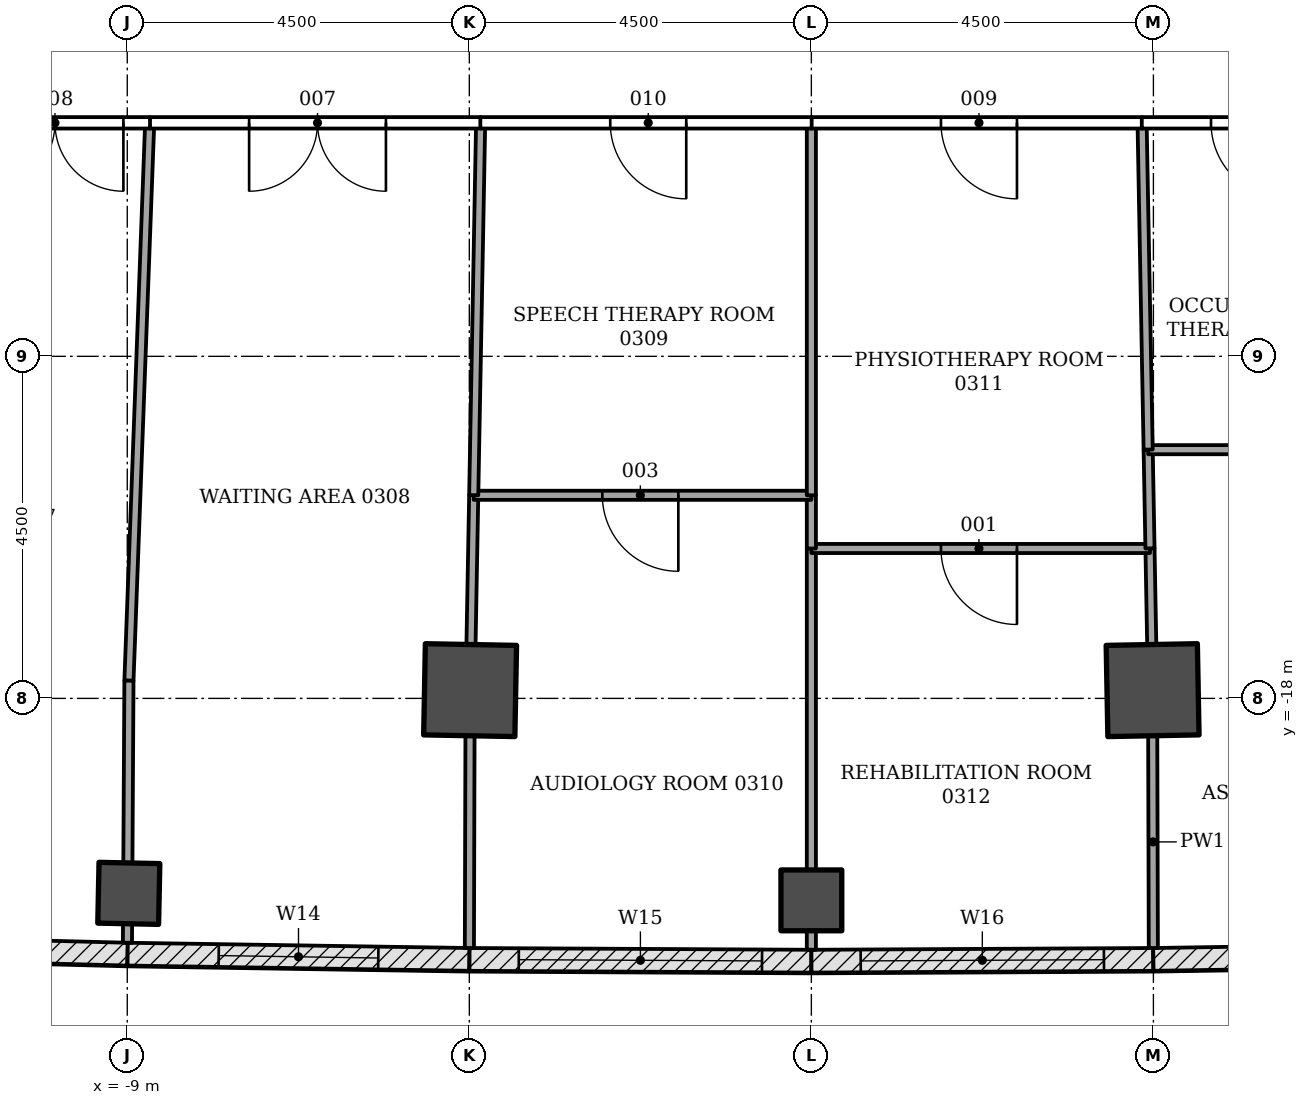
"""IFC4 building model, lengths in metres.
Left out: names, types, materials, properties, quantities, classifications, styles, units other than length and angle.
Written with IfcOpenShell. Run it as: python <this file> out.ifc"""

import sys

from ifc_helpers import new_model, si_unit, direction, frame, frame_2d, origin, origin_2d, place, context, subcontext, project, spatial, rectangle, extrude, element, fill, save


model = new_model("IFC4")
c1 = context("Model", 3, precision=1e-05, world=origin(), true_north=direction((0.0, 1.0)))
c2 = subcontext(c1, "Body", "Model", "MODEL_VIEW")
j1 = project(units=[si_unit("LENGTHUNIT", "METRE"), si_unit("PLANEANGLEUNIT", "RADIAN")], contexts=[c1])
p1 = place(None, origin())
s1 = spatial("IfcSite", under=j1, at=p1, CompositionType="ELEMENT")
p2 = place(p1, origin())
s2 = spatial("IfcBuilding", under=s1, at=p2, CompositionType="ELEMENT")
p3 = place(p2, frame((0.0, 0.0, 15.0)))
s3 = spatial("IfcBuildingStorey", under=s2, at=p3, CompositionType="ELEMENT", Elevation=15.0)
for number, where, z_axis, x_axis in (
    (1, (-4.49, -17.892, -0.25), (0.0, 0.0, 1.0), (-0.019, -1.0, 0.0)),
    (2, (4.49, -17.892, -0.25), (0.0, 0.0, 1.0), (0.019, -1.0, 0.0)),
):
    element("IfcColumn", number, at=place(p3, frame(where, z_axis=z_axis, x_axis=x_axis)), inside=s3, PredefinedType="COLUMN", context=c2, shape_type="SweptSolid", body=[
        extrude(rectangle(XDim=1.2, YDim=1.2, at=origin_2d()), origin(), (0.0, 0.0, 1.0), 4.5),
    ])
for number, where, z_axis, x_axis in (
    (3, (-8.98, -20.565, -0.25), (0.0, 0.0, 1.0), (-0.021, -1.0, 0.0)),
    (4, (0.0, -20.657, -0.25), (0.0, 0.0, 1.0), (0.0, -1.0, 0.0)),
):
    element("IfcColumn", number, at=place(p3, frame(where, z_axis=z_axis, x_axis=x_axis)), inside=s3, PredefinedType="COLUMN", context=c2, shape_type="SweptSolid", body=[
        extrude(rectangle(XDim=0.8, YDim=0.8, at=origin_2d()), origin(), (0.0, 0.0, 1.0), 4.5),
    ])
p4 = place(p3, frame((-9.922, -5.728, -0.25), z_axis=(0.0, 0.0, 1.0), x_axis=(-0.866028046028, -0.499995423472, 0.0)))
e5 = element("IfcWall", 5, at=p4, inside=s3, PredefinedType="SHEAR", context=c2, shape_type="SweptSolid", body=[
    extrude(rectangle(XDim=14.633, YDim=0.9, at=frame_2d((7.316, 0.0))), origin(), (0.0, 0.0, 1.0), 4.5),
])
p5 = place(p4, frame((7.35, 0.0, 0.25)))
e6 = element("IfcOpeningElement", 6, at=p5, cuts=e5, PredefinedType="OPENING", context=c2, shape_type="SweptSolid", body=[
    extrude(rectangle(XDim=1.5, YDim=2.1, at=frame_2d((0.75, 1.05))), frame((0.0, 0.46, 0.0), z_axis=(0.0, -1.0, 0.0), x_axis=(1.0, 0.0, 0.0)), (0.0, 0.0, 1.0), 0.92),
])
p6 = place(p3, frame((-8.998, -21.365, 0.0), z_axis=(0.0, 0.0, 1.0), x_axis=(-0.999671466587, 0.025631209312, 0.0)))
e7 = element("IfcWall", 7, at=p6, inside=s3, PredefinedType="NOTDEFINED", context=c2, shape_type="SweptSolid", body=[
    extrude(rectangle(XDim=4.496, YDim=0.3, at=frame_2d((2.248, 0.0))), origin(), (0.0, 0.0, 1.0), 4.25),
])
p7 = place(p6, frame((1.048, 0.0, 0.9)))
e8 = element("IfcOpeningElement", 8, at=p7, cuts=e7, PredefinedType="OPENING", context=c2, shape_type="SweptSolid", body=[
    extrude(rectangle(XDim=2.4, YDim=2.4, at=frame_2d((1.2, 1.2))), frame((0.0, 0.16, 0.0), z_axis=(0.0, -1.0, 0.0), x_axis=(1.0, 0.0, 0.0)), (0.0, 0.0, 1.0), 0.32),
])
p8 = place(p3, frame((-4.5, -21.434, 0.0), z_axis=(0.0, 0.0, 1.0), x_axis=(-0.999881921814, 0.015366926462, 0.0)))
e9 = element("IfcWall", 9, at=p8, inside=s3, PredefinedType="NOTDEFINED", context=c2, shape_type="SweptSolid", body=[
    extrude(rectangle(XDim=4.496, YDim=0.3, at=frame_2d((2.248, 0.0))), origin(), (0.0, 0.0, 1.0), 4.25),
])
p9 = place(p8, frame((1.198, 0.0, 0.8)))
e10 = element("IfcOpeningElement", 10, at=p9, cuts=e9, PredefinedType="OPENING", context=c2, shape_type="SweptSolid", body=[
    extrude(rectangle(XDim=2.1, YDim=3.0, at=frame_2d((1.05, 1.5))), frame((0.0, 0.16, 0.0), z_axis=(0.0, -1.0, 0.0), x_axis=(1.0, 0.0, 0.0)), (0.0, 0.0, 1.0), 0.32),
])
p10 = place(p3, frame((-0.001, -21.457, 0.0), z_axis=(0.0, 0.0, 1.0), x_axis=(-0.999986693461, 0.005158769258, 0.0)))
e11 = element("IfcWall", 11, at=p10, inside=s3, PredefinedType="NOTDEFINED", context=c2, shape_type="SweptSolid", body=[
    extrude(rectangle(XDim=4.496, YDim=0.3, at=frame_2d((2.248, 0.0))), origin(), (0.0, 0.0, 1.0), 4.25),
])
p11 = place(p10, frame((0.648, 0.0, 0.8)))
e12 = element("IfcOpeningElement", 12, at=p11, cuts=e11, PredefinedType="OPENING", context=c2, shape_type="SweptSolid", body=[
    extrude(rectangle(XDim=3.2, YDim=2.7, at=frame_2d((1.6, 1.35))), frame((0.0, 0.16, 0.0), z_axis=(0.0, -1.0, 0.0), x_axis=(1.0, 0.0, 0.0)), (0.0, 0.0, 1.0), 0.32),
])
p12 = place(p3, frame((4.497, -21.434, 0.0), z_axis=(0.0, 0.0, 1.0), x_axis=(-0.999986693461, -0.005158769258, 0.0)))
e13 = element("IfcWall", 13, at=p12, inside=s3, PredefinedType="NOTDEFINED", context=c2, shape_type="SweptSolid", body=[
    extrude(rectangle(XDim=4.496, YDim=0.3, at=frame_2d((2.248, 0.0))), origin(), (0.0, 0.0, 1.0), 4.25),
])
p13 = place(p12, frame((0.648, 0.0, 0.8)))
e14 = element("IfcOpeningElement", 14, at=p13, cuts=e13, PredefinedType="OPENING", context=c2, shape_type="SweptSolid", body=[
    extrude(rectangle(XDim=3.2, YDim=2.7, at=frame_2d((1.6, 1.35))), frame((0.0, 0.16, 0.0), z_axis=(0.0, -1.0, 0.0), x_axis=(1.0, 0.0, 0.0)), (0.0, 0.0, 1.0), 0.32),
])
p14 = place(p3, frame((8.995, -21.365, 0.0), z_axis=(0.0, 0.0, 1.0), x_axis=(-0.999881921814, -0.015366926462, 0.0)))
e15 = element("IfcWall", 15, at=p14, inside=s3, PredefinedType="NOTDEFINED", context=c2, shape_type="SweptSolid", body=[
    extrude(rectangle(XDim=4.496, YDim=0.3, at=frame_2d((2.248, 0.0))), origin(), (0.0, 0.0, 1.0), 4.25),
])
p15 = place(p14, frame((1.198, 0.0, 0.8)))
e16 = element("IfcOpeningElement", 16, at=p15, cuts=e15, PredefinedType="OPENING", context=c2, shape_type="SweptSolid", body=[
    extrude(rectangle(XDim=2.1, YDim=3.0, at=frame_2d((1.05, 1.5))), frame((0.0, 0.16, 0.0), z_axis=(0.0, -1.0, 0.0), x_axis=(1.0, 0.0, 0.0)), (0.0, 0.0, 1.0), 0.32),
])
p16 = place(p3, frame((4.478, -17.291, 0.0), z_axis=(0.0, 0.0, 1.0), x_axis=(-0.018108783452, 0.999836022537, 0.0)))
e17 = element("IfcWall", 17, at=p16, inside=s3, PredefinedType="PARTITIONING", context=c2, shape_type="SweptSolid", body=[
    extrude(rectangle(XDim=1.267, YDim=0.12, at=frame_2d((0.634, 0.0))), origin(), (0.0, 0.0, 1.0), 3.638),
])
p17 = place(p3, frame((4.499, -21.284, 0.0), z_axis=(0.0, 0.0, 1.0), x_axis=(-0.00288561233, 0.999995836612, 0.0)))
e18 = element("IfcWall", 18, at=p17, inside=s3, PredefinedType="PARTITIONING", context=c2, shape_type="SweptSolid", body=[
    extrude(rectangle(XDim=2.792, YDim=0.12, at=frame_2d((1.396, 0.0))), origin(), (0.0, 0.0, 1.0), 3.633),
])
p18 = place(p3, frame((0.0, -21.057, 0.0), z_axis=(0.0, 0.0, 1.0), x_axis=(0.0, -1.0, 0.0)))
e19 = element("IfcWall", 19, at=p18, inside=s3, PredefinedType="PARTITIONING", context=c2, shape_type="SweptSolid", body=[
    extrude(rectangle(XDim=0.25, YDim=0.12, at=frame_2d((0.125, 0.0))), origin(), (0.0, 0.0, 1.0), 4.25),
])
p19 = place(p3, frame((0.0, -16.024, 0.0), z_axis=(0.0, 0.0, 1.0), x_axis=(0.0, -1.0, 0.0)))
e20 = element("IfcWall", 20, at=p19, inside=s3, PredefinedType="PARTITIONING", context=c2, shape_type="SweptSolid", body=[
    extrude(rectangle(XDim=4.233, YDim=0.12, at=frame_2d((2.117, 0.0))), origin(), (0.0, 0.0, 1.0), 3.638),
])
p20 = place(p3, frame((4.455, -16.028, 0.0), z_axis=(0.0, 0.0, 1.0), x_axis=(-1.0, 0.0, 0.0)))
e21 = element("IfcWall", 21, at=p20, inside=s3, PredefinedType="PARTITIONING", context=c2, shape_type="SweptSolid", body=[
    extrude(rectangle(XDim=4.455, YDim=0.12, at=frame_2d((2.228, 0.0))), origin(), (0.0, 0.0, 1.0), 3.638),
])
p21 = place(p20, frame((1.75, 0.0, 0.0)))
e22 = element("IfcOpeningElement", 22, at=p21, cuts=e21, PredefinedType="OPENING", context=c2, shape_type="SweptSolid", body=[
    extrude(rectangle(XDim=1.0, YDim=2.1, at=frame_2d((0.5, 1.05))), frame((0.0, 0.07, 0.0), z_axis=(0.0, -1.0, 0.0), x_axis=(1.0, 0.0, 0.0)), (0.0, 0.0, 1.0), 0.14),
])
p22 = place(p3, frame((4.431, -14.724, 0.0), z_axis=(0.0, 0.0, 1.0), x_axis=(0.018546556452, -0.99982799783, 0.0)))
e23 = element("IfcWall", 23, at=p22, inside=s3, PredefinedType="PARTITIONING", context=c2, shape_type="SweptSolid", body=[
    extrude(rectangle(XDim=1.303, YDim=0.12, at=frame_2d((0.652, 0.0))), origin(), (0.0, 0.0, 1.0), 3.638),
])
p23 = place(p3, frame((8.865, -14.728, 0.0), z_axis=(0.0, 0.0, 1.0), x_axis=(-1.0, 0.0, 0.0)))
e24 = element("IfcWall", 24, at=p23, inside=s3, PredefinedType="PARTITIONING", context=c2, shape_type="SweptSolid", body=[
    extrude(rectangle(XDim=4.434, YDim=0.12, at=frame_2d((2.217, 0.0))), origin(), (0.0, 0.0, 1.0), 3.638),
])
p24 = place(p23, frame((1.75, 0.0, 0.0)))
e25 = element("IfcOpeningElement", 25, at=p24, cuts=e24, PredefinedType="OPENING", context=c2, shape_type="SweptSolid", body=[
    extrude(rectangle(XDim=1.0, YDim=2.1, at=frame_2d((0.5, 1.05))), frame((0.0, 0.07, 0.0), z_axis=(0.0, -1.0, 0.0), x_axis=(1.0, 0.0, 0.0)), (0.0, 0.0, 1.0), 0.14),
])
p25 = place(p3, frame((-4.491, -18.492, 0.0), z_axis=(0.0, 0.0, 1.0), x_axis=(-0.00288561233, -0.999995836612, 0.0)))
e26 = element("IfcWall", 26, at=p25, inside=s3, PredefinedType="PARTITIONING", context=c2, shape_type="SweptSolid", body=[
    extrude(rectangle(XDim=2.792, YDim=0.12, at=frame_2d((1.396, 0.0))), origin(), (0.0, 0.0, 1.0), 3.633),
])
p26 = place(p3, frame((-4.442, -15.324, 0.0), z_axis=(0.0, 0.0, 1.0), x_axis=(-0.018366021708, -0.999831330399, 0.0)))
e27 = element("IfcWall", 27, at=p26, inside=s3, PredefinedType="PARTITIONING", context=c2, shape_type="SweptSolid", body=[
    extrude(rectangle(XDim=1.967, YDim=0.12, at=frame_2d((0.984, 0.0))), origin(), (0.0, 0.0, 1.0), 3.638),
])
p27 = place(p3, frame((0.0, -16.028, 0.0), z_axis=(0.0, 0.0, 1.0), x_axis=(0.0, 1.0, 0.0)))
e28 = element("IfcWall", 28, at=p27, inside=s3, PredefinedType="PARTITIONING", context=c2, shape_type="SweptSolid", body=[
    extrude(rectangle(XDim=0.704, YDim=0.12, at=frame_2d((0.352, 0.0))), origin(), (0.0, 0.0, 1.0), 3.638),
])
p28 = place(p3, frame((0.0, -15.328, 0.0), z_axis=(0.0, 0.0, 1.0), x_axis=(-1.0, 0.0, 0.0)))
e29 = element("IfcWall", 29, at=p28, inside=s3, PredefinedType="PARTITIONING", context=c2, shape_type="SweptSolid", body=[
    extrude(rectangle(XDim=4.442, YDim=0.12, at=frame_2d((2.221, 0.0))), origin(), (0.0, 0.0, 1.0), 3.638),
])
p29 = place(p28, frame((1.75, 0.0, 0.0)))
e30 = element("IfcOpeningElement", 30, at=p29, cuts=e29, PredefinedType="OPENING", context=c2, shape_type="SweptSolid", body=[
    extrude(rectangle(XDim=1.0, YDim=2.1, at=frame_2d((0.5, 1.05))), frame((0.0, 0.07, 0.0), z_axis=(0.0, -1.0, 0.0), x_axis=(1.0, 0.0, 0.0)), (0.0, 0.0, 1.0), 0.14),
])
p30 = place(p3, frame((-8.996, -20.965, 0.0), z_axis=(0.0, 0.0, 1.0), x_axis=(-0.007812261592, -0.999969483819, 0.0)))
e31 = element("IfcWall", 31, at=p30, inside=s3, PredefinedType="PARTITIONING", context=c2, shape_type="SweptSolid", body=[
    extrude(rectangle(XDim=0.25, YDim=0.12, at=frame_2d((0.125, 0.0))), origin(), (0.0, 0.0, 1.0), 4.25),
])
p31 = place(p3, frame((-8.705, -10.429, 0.0), z_axis=(0.0, 0.0, 1.0), x_axis=(-0.037170289837, -0.999308945999, 0.0)))
e32 = element("IfcWall", 32, at=p31, inside=s3, PredefinedType="PARTITIONING", context=c2, shape_type="SweptSolid", body=[
    extrude(rectangle(XDim=7.343, YDim=0.12, at=frame_2d((3.672, 0.0))), origin(), (0.0, 0.0, 1.0), 3.638),
])
p32 = place(p3, frame((-8.978, -17.767, 0.0), z_axis=(0.0, 0.0, 1.0), x_axis=(-0.005803200997, -0.999983161287, 0.0)))
e33 = element("IfcWall", 33, at=p32, inside=s3, PredefinedType="PARTITIONING", context=c2, shape_type="SweptSolid", body=[
    extrude(rectangle(XDim=2.398, YDim=0.12, at=frame_2d((1.199, 0.0))), origin(), (0.0, 0.0, 1.0), 3.638),
])
p33 = place(p3, frame((-4.442, -15.327, 0.0), z_axis=(0.0, 0.0, 1.0), x_axis=(0.018539331325, 0.999828131828, 0.0)))
e34 = element("IfcWall", 34, at=p33, inside=s3, PredefinedType="PARTITIONING", context=c2, shape_type="SweptSolid", body=[
    extrude(rectangle(XDim=4.899, YDim=0.12, at=frame_2d((2.449, 0.0))), origin(), (0.0, 0.0, 1.0), 3.638),
])
p34 = place(p3, frame((-4.347, -10.428, 0.0), z_axis=(0.0, 0.0, 1.0), x_axis=(-1.0, 0.0, 0.0)))
e35 = element("IfcWall", 35, at=p34, inside=s3, PredefinedType="PARTITIONING", context=c2, shape_type="SweptSolid", body=[
    extrude(rectangle(XDim=4.362, YDim=0.15, at=frame_2d((2.181, 0.0))), origin(), (0.0, 0.0, 1.0), 3.638),
])
p35 = place(p34, frame((1.25, 0.0, 0.0)))
e36 = element("IfcOpeningElement", 36, at=p35, cuts=e35, PredefinedType="OPENING", context=c2, shape_type="SweptSolid", body=[
    extrude(rectangle(XDim=1.8, YDim=2.1, at=frame_2d((0.9, 1.05))), frame((0.0, 0.085, 0.0), z_axis=(0.0, -1.0, 0.0), x_axis=(1.0, 0.0, 0.0)), (0.0, 0.0, 1.0), 0.17),
])
p36 = place(p3, frame((-8.701, -10.428, 0.0), z_axis=(0.0, 0.0, 1.0), x_axis=(-1.0, 0.0, 0.0)))
e37 = element("IfcWall", 37, at=p36, inside=s3, PredefinedType="PARTITIONING", context=c2, shape_type="SweptSolid", body=[
    extrude(rectangle(XDim=2.548, YDim=0.15, at=frame_2d((1.274, 0.0))), origin(), (0.0, 0.0, 1.0), 3.638),
])
p37 = place(p36, frame((0.35, 0.0, 0.0)))
e38 = element("IfcOpeningElement", 38, at=p37, cuts=e37, PredefinedType="OPENING", context=c2, shape_type="SweptSolid", body=[
    extrude(rectangle(XDim=1.8, YDim=2.1, at=frame_2d((0.9, 1.05))), frame((0.0, 0.085, 0.0), z_axis=(0.0, -1.0, 0.0), x_axis=(1.0, 0.0, 0.0)), (0.0, 0.0, 1.0), 0.17),
])
p38 = place(p3, frame((0.0, -10.428, 0.0), z_axis=(0.0, 0.0, 1.0), x_axis=(0.0, -1.0, 0.0)))
e39 = element("IfcWall", 39, at=p38, inside=s3, PredefinedType="PARTITIONING", context=c2, shape_type="SweptSolid", body=[
    extrude(rectangle(XDim=4.9, YDim=0.12, at=frame_2d((2.45, 0.0))), origin(), (0.0, 0.0, 1.0), 3.638),
])
p39 = place(p3, frame((4.431, -14.727, 0.0), z_axis=(0.0, 0.0, 1.0), x_axis=(-0.018571065409, 0.999827542894, 0.0)))
e40 = element("IfcWall", 40, at=p39, inside=s3, PredefinedType="PARTITIONING", context=c2, shape_type="SweptSolid", body=[
    extrude(rectangle(XDim=4.299, YDim=0.12, at=frame_2d((2.149, 0.0))), origin(), (0.0, 0.0, 1.0), 3.638),
])
p40 = place(p3, frame((4.355, -10.428, 0.0), z_axis=(0.0, 0.0, 1.0), x_axis=(-1.0, 0.0, 0.0)))
e41 = element("IfcWall", 41, at=p40, inside=s3, PredefinedType="PARTITIONING", context=c2, shape_type="SweptSolid", body=[
    extrude(rectangle(XDim=4.359, YDim=0.15, at=frame_2d((2.179, 0.0))), origin(), (0.0, 0.0, 1.0), 3.638),
])
p41 = place(p40, frame((1.65, 0.0, 0.0)))
e42 = element("IfcOpeningElement", 42, at=p41, cuts=e41, PredefinedType="OPENING", context=c2, shape_type="SweptSolid", body=[
    extrude(rectangle(XDim=1.0, YDim=2.1, at=frame_2d((0.5, 1.05))), frame((0.0, 0.085, 0.0), z_axis=(0.0, -1.0, 0.0), x_axis=(1.0, 0.0, 0.0)), (0.0, 0.0, 1.0), 0.17),
])
p42 = place(p3, frame((0.004, -10.428, 0.0), z_axis=(0.0, 0.0, 1.0), x_axis=(-1.0, 0.0, 0.0)))
e43 = element("IfcWall", 43, at=p42, inside=s3, PredefinedType="PARTITIONING", context=c2, shape_type="SweptSolid", body=[
    extrude(rectangle(XDim=4.359, YDim=0.15, at=frame_2d((2.179, 0.0))), origin(), (0.0, 0.0, 1.0), 3.638),
])
p43 = place(p42, frame((1.65, 0.0, 0.0)))
e44 = element("IfcOpeningElement", 44, at=p43, cuts=e43, PredefinedType="OPENING", context=c2, shape_type="SweptSolid", body=[
    extrude(rectangle(XDim=1.0, YDim=2.1, at=frame_2d((0.5, 1.05))), frame((0.0, 0.085, 0.0), z_axis=(0.0, -1.0, 0.0), x_axis=(1.0, 0.0, 0.0)), (0.0, 0.0, 1.0), 0.17),
])
p44 = place(p3, frame((7.208, -10.428, 0.0), z_axis=(0.0, 0.0, 1.0), x_axis=(-1.0, 0.0, 0.0)))
e45 = element("IfcWall", 45, at=p44, inside=s3, PredefinedType="PARTITIONING", context=c2, shape_type="SweptSolid", body=[
    extrude(rectangle(XDim=2.861, YDim=0.15, at=frame_2d((1.431, 0.0))), origin(), (0.0, 0.0, 1.0), 3.638),
])
p45 = place(p44, frame((0.95, 0.0, 0.0)))
e46 = element("IfcOpeningElement", 46, at=p45, cuts=e45, PredefinedType="OPENING", context=c2, shape_type="SweptSolid", body=[
    extrude(rectangle(XDim=1.0, YDim=2.1, at=frame_2d((0.5, 1.05))), frame((0.0, 0.085, 0.0), z_axis=(0.0, -1.0, 0.0), x_axis=(1.0, 0.0, 0.0)), (0.0, 0.0, 1.0), 0.17),
])
p46 = place(p9, origin())
e47 = element("IfcWindow", 47, at=p46, inside=s3, PartitioningType="DOUBLE_PANEL_HORIZONTAL", PredefinedType="WINDOW", context=c2, shape_type="SweptSolid", body=[
    extrude(rectangle(XDim=2.1, YDim=3.0, at=frame_2d((1.05, 1.5))), frame((0.0, 0.03, 0.0), z_axis=(0.0, -1.0, 0.0), x_axis=(1.0, 0.0, 0.0)), (0.0, 0.0, 1.0), 0.06),
])
fill(e10, e47)
p47 = place(p11, origin())
e48 = element("IfcWindow", 48, at=p47, inside=s3, PartitioningType="TRIPLE_PANEL_VERTICAL", PredefinedType="WINDOW", context=c2, shape_type="SweptSolid", body=[
    extrude(rectangle(XDim=3.2, YDim=2.7, at=frame_2d((1.6, 1.35))), frame((0.0, 0.03, 0.0), z_axis=(0.0, -1.0, 0.0), x_axis=(1.0, 0.0, 0.0)), (0.0, 0.0, 1.0), 0.06),
])
fill(e12, e48)
p48 = place(p13, origin())
e49 = element("IfcWindow", 49, at=p48, inside=s3, PartitioningType="TRIPLE_PANEL_VERTICAL", PredefinedType="WINDOW", context=c2, shape_type="SweptSolid", body=[
    extrude(rectangle(XDim=3.2, YDim=2.7, at=frame_2d((1.6, 1.35))), frame((0.0, 0.03, 0.0), z_axis=(0.0, -1.0, 0.0), x_axis=(1.0, 0.0, 0.0)), (0.0, 0.0, 1.0), 0.06),
])
fill(e14, e49)
p49 = place(p21, origin())
e50 = element("IfcDoor", 50, at=p49, inside=s3, OperationType="SINGLE_SWING_RIGHT", PredefinedType="DOOR", context=c2, shape_type="SweptSolid", body=[
    extrude(rectangle(XDim=1.0, YDim=2.1, at=frame_2d((0.5, 1.05))), frame((0.0, 0.025, 0.0), z_axis=(0.0, -1.0, 0.0), x_axis=(1.0, 0.0, 0.0)), (0.0, 0.0, 1.0), 0.05),
])
fill(e22, e50)
p50 = place(p29, origin())
e51 = element("IfcDoor", 51, at=p50, inside=s3, OperationType="SINGLE_SWING_RIGHT", PredefinedType="DOOR", context=c2, shape_type="SweptSolid", body=[
    extrude(rectangle(XDim=1.0, YDim=2.1, at=frame_2d((0.5, 1.05))), frame((0.0, 0.025, 0.0), z_axis=(0.0, -1.0, 0.0), x_axis=(1.0, 0.0, 0.0)), (0.0, 0.0, 1.0), 0.05),
])
fill(e30, e51)
p51 = place(p35, origin())
e52 = element("IfcDoor", 52, at=p51, inside=s3, OperationType="DOUBLE_DOOR_SINGLE_SWING", PredefinedType="DOOR", context=c2, shape_type="SweptSolid", body=[
    extrude(rectangle(XDim=1.8, YDim=2.1, at=frame_2d((0.9, 1.05))), frame((0.0, 0.025, 0.0), z_axis=(0.0, -1.0, 0.0), x_axis=(1.0, 0.0, 0.0)), (0.0, 0.0, 1.0), 0.05),
])
fill(e36, e52)
p52 = place(p37, origin())
e53 = element("IfcDoor", 53, at=p52, inside=s3, OperationType="DOUBLE_DOOR_SINGLE_SWING", PredefinedType="DOOR", context=c2, shape_type="SweptSolid", body=[
    extrude(rectangle(XDim=1.8, YDim=2.1, at=frame_2d((0.9, 1.05))), frame((0.0, 0.025, 0.0), z_axis=(0.0, -1.0, 0.0), x_axis=(1.0, 0.0, 0.0)), (0.0, 0.0, 1.0), 0.05),
])
fill(e38, e53)
p53 = place(p41, origin())
e54 = element("IfcDoor", 54, at=p53, inside=s3, OperationType="SINGLE_SWING_LEFT", PredefinedType="DOOR", context=c2, shape_type="SweptSolid", body=[
    extrude(rectangle(XDim=1.0, YDim=2.1, at=frame_2d((0.5, 1.05))), frame((0.0, 0.025, 0.0), z_axis=(0.0, -1.0, 0.0), x_axis=(1.0, 0.0, 0.0)), (0.0, 0.0, 1.0), 0.05),
])
fill(e42, e54)
p54 = place(p43, origin())
e55 = element("IfcDoor", 55, at=p54, inside=s3, OperationType="SINGLE_SWING_LEFT", PredefinedType="DOOR", context=c2, shape_type="SweptSolid", body=[
    extrude(rectangle(XDim=1.0, YDim=2.1, at=frame_2d((0.5, 1.05))), frame((0.0, 0.025, 0.0), z_axis=(0.0, -1.0, 0.0), x_axis=(1.0, 0.0, 0.0)), (0.0, 0.0, 1.0), 0.05),
])
fill(e44, e55)
p55 = place(p45, origin())
e56 = element("IfcDoor", 56, at=p55, inside=s3, OperationType="SINGLE_SWING_RIGHT", PredefinedType="DOOR", context=c2, shape_type="SweptSolid", body=[
    extrude(rectangle(XDim=1.0, YDim=2.1, at=frame_2d((0.5, 1.05))), frame((0.0, 0.025, 0.0), z_axis=(0.0, -1.0, 0.0), x_axis=(1.0, 0.0, 0.0)), (0.0, 0.0, 1.0), 0.05),
])
fill(e46, e56)
save(model, sys.argv[1])
